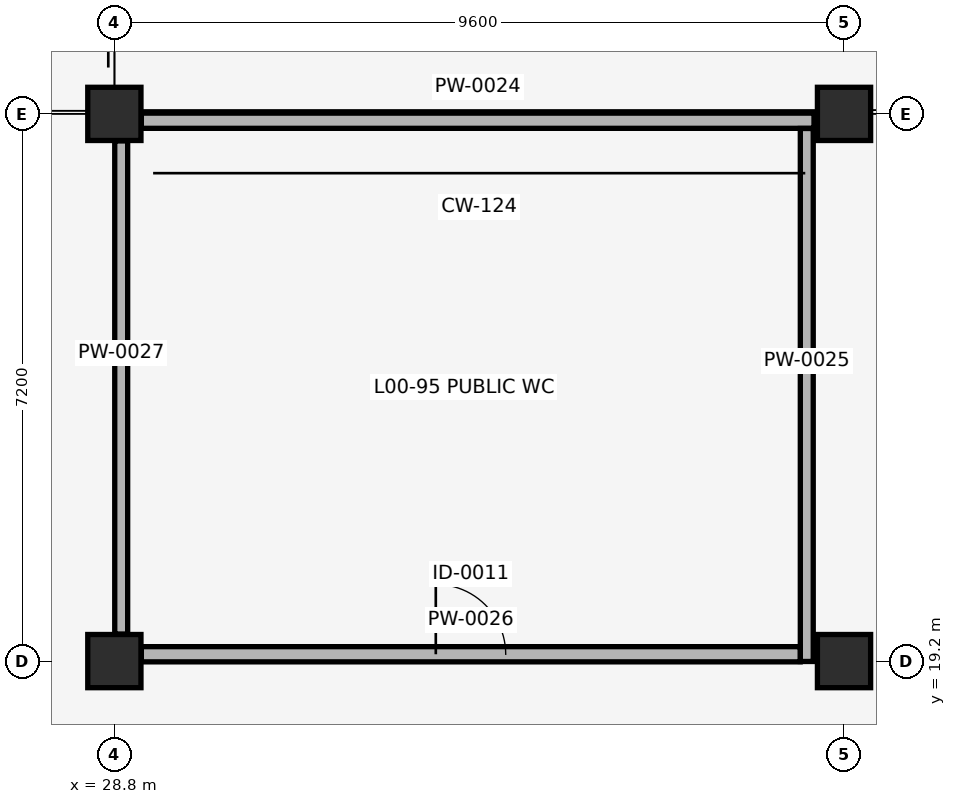
"""IFC4 building model, lengths in metres.
Left out: names, types, materials, properties, quantities, classifications, styles, units other than length and angle.
Written with IfcOpenShell. Run it as: python <this file> out.ifc"""

import sys

from ifc_helpers import new_model, si_unit, direction, frame, frame_2d, origin, origin_2d, place, context, subcontext, project, spatial, rectangle, circle, extrude, element, fill, save


model = new_model("IFC4")
c1 = context("Model", 3, precision=1e-05, world=origin(), true_north=direction((0.0, 1.0)))
c2 = subcontext(c1, "Body", "Model", "MODEL_VIEW")
j1 = project(units=[si_unit("LENGTHUNIT", "METRE"), si_unit("PLANEANGLEUNIT", "RADIAN")], contexts=[c1])
p1 = place(None, origin())
s1 = spatial("IfcSite", under=j1, at=p1, CompositionType="ELEMENT")
p2 = place(p1, origin())
s2 = spatial("IfcBuilding", under=s1, at=p2, CompositionType="ELEMENT")
p3 = place(p2, origin())
s3 = spatial("IfcBuildingStorey", under=s2, at=p3, CompositionType="ELEMENT", Elevation=0.0)
for number, where, z_axis, x_axis in (
    (1, (28.8, 19.2, 0.0), (0.0, 0.0, 1.0), (1.0, 0.0, 0.0)),
    (2, (28.8, 26.4, 0.0), (0.0, 0.0, 1.0), (1.0, 0.0, 0.0)),
    (3, (38.4, 19.2, 0.0), (0.0, 0.0, 1.0), (1.0, 0.0, 0.0)),
    (4, (38.4, 26.4, 0.0), (0.0, 0.0, 1.0), (1.0, 0.0, 0.0)),
):
    element("IfcColumn", number, at=place(p3, frame(where, z_axis=z_axis, x_axis=x_axis)), inside=s3, PredefinedType="COLUMN", context=c2, shape_type="SweptSolid", body=[
        extrude(circle(Radius=0.35, at=origin_2d()), origin(), (0.0, 0.0, 1.0), 4.42),
    ])
p4 = place(p3, frame((29.155, 26.31, 0.0), z_axis=(0.0, 0.0, 1.0), x_axis=(1.0, 0.0, 0.0)))
e5 = element("IfcWall", 5, at=p4, inside=s3, PredefinedType="PLUMBINGWALL", context=c2, shape_type="SweptSolid", body=[
    extrude(rectangle(XDim=8.85, YDim=0.2, at=frame_2d((4.425, 0.0))), origin(), (0.0, 0.0, 1.0), 3.31),
])
p5 = place(p3, frame((37.91, 19.195, 0.0), z_axis=(0.0, 0.0, 1.0), x_axis=(0.0, 1.0, 0.0)))
e6 = element("IfcWall", 6, at=p5, inside=s3, PredefinedType="PLUMBINGWALL", context=c2, shape_type="SweptSolid", body=[
    extrude(rectangle(XDim=7.013, YDim=0.17, at=frame_2d((3.506, 0.0))), origin(), (0.0, 0.0, 1.0), 3.31),
])
p6 = place(p3, frame((29.155, 19.29, 0.0), z_axis=(0.0, 0.0, 1.0), x_axis=(1.0, 0.0, 0.0)))
e7 = element("IfcWall", 7, at=p6, inside=s3, PredefinedType="PLUMBINGWALL", context=c2, shape_type="SweptSolid", body=[
    extrude(rectangle(XDim=8.668, YDim=0.2, at=frame_2d((4.334, 0.0))), origin(), (0.0, 0.0, 1.0), 3.46),
])
p7 = place(p6, frame((3.874, 0.0, 0.0)))
e8 = element("IfcOpeningElement", 8, at=p7, cuts=e7, PredefinedType="OPENING", context=c2, shape_type="SweptSolid", body=[
    extrude(rectangle(XDim=0.92, YDim=2.08, at=frame_2d((0.46, 1.04))), frame((0.0, 0.11, 0.0), z_axis=(0.0, -1.0, 0.0), x_axis=(1.0, 0.0, 0.0)), (0.0, 0.0, 1.0), 0.22),
])
p8 = place(p3, frame((28.89, 19.555, 0.0), z_axis=(0.0, 0.0, 1.0), x_axis=(0.0, 1.0, 0.0)))
e9 = element("IfcWall", 9, at=p8, inside=s3, PredefinedType="PLUMBINGWALL", context=c2, shape_type="SweptSolid", body=[
    extrude(rectangle(XDim=6.49, YDim=0.17, at=frame_2d((3.245, 0.0))), origin(), (0.0, 0.0, 1.0), 3.31),
])
p9 = place(p7, origin())
e10 = element("IfcDoor", 10, at=p9, inside=s3, OperationType="SINGLE_SWING_LEFT", PredefinedType="DOOR", context=c2, shape_type="SweptSolid", body=[
    extrude(rectangle(XDim=0.92, YDim=2.08, at=frame_2d((0.46, 1.04))), frame((0.0, 0.025, 0.0), z_axis=(0.0, -1.0, 0.0), x_axis=(1.0, 0.0, 0.0)), (0.0, 0.0, 1.0), 0.05),
])
fill(e8, e10)
save(model, sys.argv[1])
